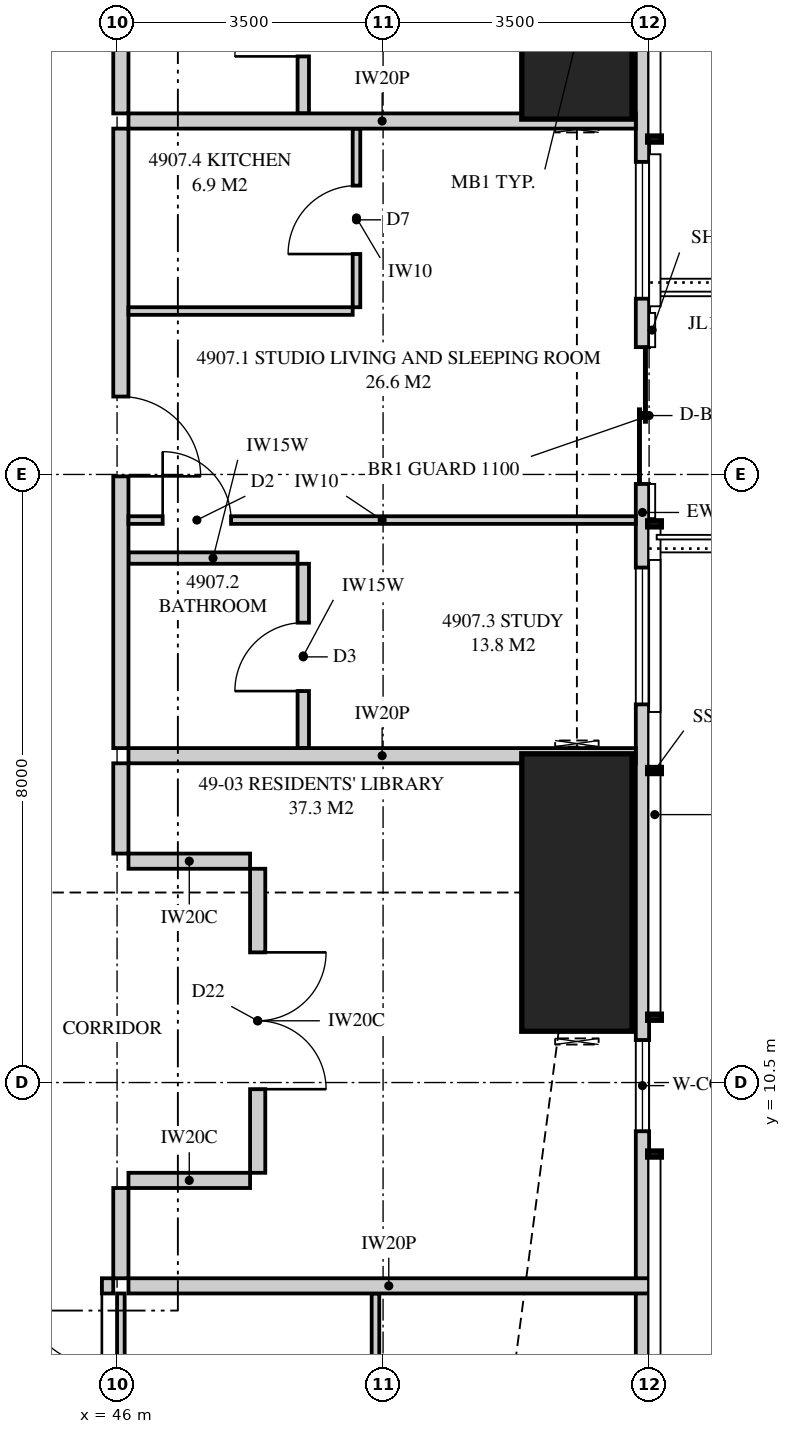
"""IFC4 building model, lengths in metres.
Left out: names, types, materials, properties, quantities, classifications, styles, units other than length and angle.
Written with IfcOpenShell. Run it as: python <this file> out.ifc"""

import sys

from ifc_helpers import new_model, si_unit, direction, frame, frame_2d, origin, origin_2d, place, context, subcontext, project, spatial, polyline, rectangle, outline, extrude, element, fill, save


model = new_model("IFC4")
c1 = context("Model", 3, precision=1e-05, world=origin(), true_north=direction((0.0, 1.0)))
c2 = subcontext(c1, "Body", "Model", "MODEL_VIEW")
j1 = project(units=[si_unit("LENGTHUNIT", "METRE"), si_unit("PLANEANGLEUNIT", "RADIAN")], contexts=[c1])
p1 = place(None, origin())
s1 = spatial("IfcSite", under=j1, at=p1, CompositionType="ELEMENT")
p2 = place(p1, origin())
s2 = spatial("IfcBuilding", under=s1, at=p2, CompositionType="ELEMENT")
p3 = place(p2, frame((0.0, 0.0, 181.15)))
s3 = spatial("IfcBuildingStorey", under=s2, at=p3, CompositionType="ELEMENT", Elevation=181.15)
for number, where, z_axis, x_axis in (
    (1, (52.05, 13.0, 0.0), (0.0, 0.0, 1.0), (1.0, 0.0, 0.0)),
    (2, (52.05, 25.0, 0.0), (0.0, 0.0, 1.0), (1.0, 0.0, 0.0)),
):
    element("IfcColumn", number, at=place(p3, frame(where, z_axis=z_axis, x_axis=x_axis)), inside=s3, PredefinedType="COLUMN", context=c2, shape_type="SweptSolid", body=[
        extrude(rectangle(XDim=1.45, YDim=3.65, at=origin_2d()), origin(), (0.0, 0.0, 1.0), 3.35),
    ])
p4 = place(p3, frame((52.913, 3.051, 0.0), z_axis=(0.0, 0.0, 1.0), x_axis=(0.0, 1.0, 0.0)))
e3 = element("IfcWall", 3, at=p4, inside=s3, PredefinedType="SOLIDWALL", context=c2, shape_type="SweptSolid", body=[
    extrude(outline(polyline([(0.0, 0.0), (29.897, 0.0), (29.897, 3.11), (22.167, 3.11), (22.167, 2.15), (22.074, 2.15), (22.074, 3.11), (21.949, 3.11), (21.949, 2.15), (9.949, 2.15), (9.949, 3.11), (9.847, 3.11), (9.847, 2.15), (9.706, 2.15), (9.706, 3.11), (0.0, 3.11), (0.0, 0.0)])), frame((0.0, 0.087, 0.0), z_axis=(0.0, -1.0, 0.0), x_axis=(1.0, 0.0, 0.0)), (0.0, 0.0, 1.0), 0.175),
])
p5 = place(p4, frame((6.808, 0.0, 0.4)))
e4 = element("IfcOpeningElement", 4, at=p5, cuts=e3, PredefinedType="OPENING", context=c2, shape_type="SweptSolid", body=[
    extrude(rectangle(XDim=1.2, YDim=1.7, at=frame_2d((0.6, 0.85))), frame((0.0, 0.097, 0.0), z_axis=(0.0, -1.0, 0.0), x_axis=(1.0, 0.0, 0.0)), (0.0, 0.0, 1.0), 0.195),
])
p6 = place(p4, frame((12.424, 0.0, 0.4)))
e5 = element("IfcOpeningElement", 5, at=p6, cuts=e3, PredefinedType="OPENING", context=c2, shape_type="SweptSolid", body=[
    extrude(rectangle(XDim=1.8, YDim=1.7, at=frame_2d((0.9, 0.85))), frame((0.0, 0.097, 0.0), z_axis=(0.0, -1.0, 0.0), x_axis=(1.0, 0.0, 0.0)), (0.0, 0.0, 1.0), 0.195),
])
p7 = place(p4, frame((15.324, 0.0, 0.0)))
e6 = element("IfcOpeningElement", 6, at=p7, cuts=e3, PredefinedType="OPENING", context=c2, shape_type="SweptSolid", body=[
    extrude(rectangle(XDim=1.8, YDim=2.1, at=frame_2d((0.9, 1.05))), frame((0.0, 0.097, 0.0), z_axis=(0.0, -1.0, 0.0), x_axis=(1.0, 0.0, 0.0)), (0.0, 0.0, 1.0), 0.195),
])
p8 = place(p4, frame((17.761, 0.0, 0.4)))
e7 = element("IfcOpeningElement", 7, at=p8, cuts=e3, PredefinedType="OPENING", context=c2, shape_type="SweptSolid", body=[
    extrude(rectangle(XDim=1.8, YDim=1.7, at=frame_2d((0.9, 0.85))), frame((0.0, 0.097, 0.0), z_axis=(0.0, -1.0, 0.0), x_axis=(1.0, 0.0, 0.0)), (0.0, 0.0, 1.0), 0.195),
])
p9 = place(p4, frame((23.874, 0.0, 0.4)))
e8 = element("IfcOpeningElement", 8, at=p9, cuts=e3, PredefinedType="OPENING", context=c2, shape_type="SweptSolid", body=[
    extrude(rectangle(XDim=1.8, YDim=1.7, at=frame_2d((0.9, 0.85))), frame((0.0, 0.097, 0.0), z_axis=(0.0, -1.0, 0.0), x_axis=(1.0, 0.0, 0.0)), (0.0, 0.0, 1.0), 0.195),
])
p10 = place(p4, frame((26.871, 0.0, 0.4)))
e9 = element("IfcOpeningElement", 9, at=p10, cuts=e3, PredefinedType="OPENING", context=c2, shape_type="SweptSolid", body=[
    extrude(rectangle(XDim=1.8, YDim=1.7, at=frame_2d((0.9, 0.85))), frame((0.0, 0.097, 0.0), z_axis=(0.0, -1.0, 0.0), x_axis=(1.0, 0.0, 0.0)), (0.0, 0.0, 1.0), 0.195),
])
p11 = place(p3, frame((42.05, 7.825, 0.0), z_axis=(0.0, 0.0, 1.0), x_axis=(1.0, 0.0, 0.0)))
e10 = element("IfcWall", 10, at=p11, inside=s3, PredefinedType="PARTITIONING", context=c2, shape_type="SweptSolid", body=[
    extrude(outline(polyline([(0.0, 0.0), (3.9, 0.0), (3.9, 3.11), (1.037, 3.11), (1.037, 2.541), (0.363, 2.541), (0.363, 3.11), (0.0, 3.11), (0.0, 0.0)])), frame((0.0, 0.1, 0.0), z_axis=(0.0, -1.0, 0.0), x_axis=(1.0, 0.0, 0.0)), (0.0, 0.0, 1.0), 0.2),
])
p12 = place(p11, frame((2.7, 0.0, 0.0)))
e11 = element("IfcOpeningElement", 11, at=p12, cuts=e10, PredefinedType="OPENING", context=c2, shape_type="SweptSolid", body=[
    extrude(rectangle(XDim=1.05, YDim=2.2, at=frame_2d((0.525, 1.1))), frame((0.0, 0.11, 0.0), z_axis=(0.0, -1.0, 0.0), x_axis=(1.0, 0.0, 0.0)), (0.0, 0.0, 1.0), 0.22),
])
p13 = place(p3, frame((49.4, 0.175, 0.0), z_axis=(0.0, 0.0, 1.0), x_axis=(0.0, 1.0, 0.0)))
e12 = element("IfcWall", 12, at=p13, inside=s3, PredefinedType="PARTITIONING", context=c2, shape_type="SweptSolid", body=[
    extrude(outline(polyline([(0.0, 0.0), (7.55, 0.0), (7.55, 3.11), (2.825, 3.11), (2.825, 2.15), (1.079, 2.15), (1.079, 3.11), (0.0, 3.11), (0.0, 0.0)])), frame((0.0, 0.05, 0.0), z_axis=(0.0, -1.0, 0.0), x_axis=(1.0, 0.0, 0.0)), (0.0, 0.0, 1.0), 0.1),
])
p14 = place(p13, frame((3.7, 0.0, 0.0)))
e13 = element("IfcOpeningElement", 13, at=p14, cuts=e12, PredefinedType="OPENING", context=c2, shape_type="SweptSolid", body=[
    extrude(rectangle(XDim=0.9, YDim=2.1, at=frame_2d((0.45, 1.05))), frame((0.0, 0.06, 0.0), z_axis=(0.0, -1.0, 0.0), x_axis=(1.0, 0.0, 0.0)), (0.0, 0.0, 1.0), 0.12),
])
p15 = place(p3, frame((46.05, 4.775, 0.0), z_axis=(0.0, 0.0, 1.0), x_axis=(0.0, 1.0, 0.0)))
e14 = element("IfcWall", 14, at=p15, inside=s3, PredefinedType="PARTITIONING", context=c2, shape_type="SweptSolid", body=[
    extrude(rectangle(XDim=2.95, YDim=0.1, at=frame_2d((1.475, 0.0))), origin(), (0.0, 0.0, 1.0), 3.11),
])
p16 = place(p3, frame((46.15, 7.825, 0.0), z_axis=(0.0, 0.0, 1.0), x_axis=(1.0, 0.0, 0.0)))
e15 = element("IfcWall", 15, at=p16, inside=s3, PredefinedType="PARTITIONING", context=c2, shape_type="SweptSolid", body=[
    extrude(outline(polyline([(0.0, 0.0), (6.85, 0.0), (6.85, 3.11), (6.138, 3.11), (6.138, 2.15), (4.303, 2.15), (4.303, 3.11), (0.0, 3.11), (0.0, 0.0)])), frame((0.0, 0.1, 0.0), z_axis=(0.0, -1.0, 0.0), x_axis=(1.0, 0.0, 0.0)), (0.0, 0.0, 1.0), 0.2),
])
p17 = place(p3, frame((52.825, 14.8, 0.0), z_axis=(0.0, 0.0, 1.0), x_axis=(-1.0, 0.0, 0.0)))
e16 = element("IfcWall", 16, at=p17, inside=s3, PredefinedType="PARTITIONING", context=c2, shape_type="SweptSolid", body=[
    extrude(outline(polyline([(0.0, 0.0), (6.675, 0.0), (6.675, 3.11), (1.685, 3.11), (1.685, 2.15), (0.0, 2.15), (0.0, 3.11), (0.0, 0.0)])), frame((0.0, 0.1, 0.0), z_axis=(0.0, -1.0, 0.0), x_axis=(1.0, 0.0, 0.0)), (0.0, 0.0, 1.0), 0.2),
])
p18 = place(p3, frame((46.05, 7.925, 0.0), z_axis=(0.0, 0.0, 1.0), x_axis=(0.0, 1.0, 0.0)))
e17 = element("IfcWall", 17, at=p18, inside=s3, PredefinedType="PARTITIONING", context=c2, shape_type="SweptSolid", body=[
    extrude(rectangle(XDim=1.188, YDim=0.2, at=frame_2d((0.594, 0.0))), origin(), (0.0, 0.0, 1.0), 3.11),
])
p19 = place(p3, frame((52.825, 23.15, 0.0), z_axis=(0.0, 0.0, 1.0), x_axis=(-1.0, 0.0, 0.0)))
e18 = element("IfcWall", 18, at=p19, inside=s3, PredefinedType="PARTITIONING", context=c2, shape_type="SweptSolid", body=[
    extrude(outline(polyline([(0.0, 0.0), (6.675, 0.0), (6.675, 3.11), (1.685, 3.11), (1.685, 2.15), (0.0, 2.15), (0.0, 3.11), (0.0, 0.0)])), frame((0.0, 0.1, 0.0), z_axis=(0.0, -1.0, 0.0), x_axis=(1.0, 0.0, 0.0)), (0.0, 0.0, 1.0), 0.2),
])
p20 = place(p3, frame((46.05, 14.9, 0.0), z_axis=(0.0, 0.0, 1.0), x_axis=(0.0, 1.0, 0.0)))
e19 = element("IfcWall", 19, at=p20, inside=s3, PredefinedType="PARTITIONING", context=c2, shape_type="SweptSolid", body=[
    extrude(rectangle(XDim=8.15, YDim=0.2, at=frame_2d((4.075, 0.0))), origin(), (0.0, 0.0, 1.0), 3.11),
])
p21 = place(p20, frame((3.575, 0.0, 0.0)))
e20 = element("IfcOpeningElement", 20, at=p21, cuts=e19, PredefinedType="OPENING", context=c2, shape_type="SweptSolid", body=[
    extrude(rectangle(XDim=1.05, YDim=2.2, at=frame_2d((0.525, 1.1))), frame((0.0, 0.11, 0.0), z_axis=(0.0, -1.0, 0.0), x_axis=(1.0, 0.0, 0.0)), (0.0, 0.0, 1.0), 0.22),
])
p22 = place(p3, frame((48.45, 14.9, 0.0), z_axis=(0.0, 0.0, 1.0), x_axis=(0.0, 1.0, 0.0)))
e21 = element("IfcWall", 21, at=p22, inside=s3, PredefinedType="PLUMBINGWALL", context=c2, shape_type="SweptSolid", body=[
    extrude(rectangle(XDim=2.425, YDim=0.15, at=frame_2d((1.212, 0.0))), origin(), (0.0, 0.0, 1.0), 3.11),
])
p23 = place(p22, frame((0.75, 0.0, 0.0)))
e22 = element("IfcOpeningElement", 22, at=p23, cuts=e21, PredefinedType="OPENING", context=c2, shape_type="SweptSolid", body=[
    extrude(rectangle(XDim=0.9, YDim=2.1, at=frame_2d((0.45, 1.05))), frame((0.0, 0.085, 0.0), z_axis=(0.0, -1.0, 0.0), x_axis=(1.0, 0.0, 0.0)), (0.0, 0.0, 1.0), 0.17),
])
p24 = place(p3, frame((48.375, 17.4, 0.0), z_axis=(0.0, 0.0, 1.0), x_axis=(-1.0, 0.0, 0.0)))
e23 = element("IfcWall", 23, at=p24, inside=s3, PredefinedType="PLUMBINGWALL", context=c2, shape_type="SweptSolid", body=[
    extrude(rectangle(XDim=2.225, YDim=0.15, at=frame_2d((1.113, 0.0))), origin(), (0.0, 0.0, 1.0), 3.11),
])
p25 = place(p3, frame((52.825, 17.9, 0.0), z_axis=(0.0, 0.0, 1.0), x_axis=(-1.0, 0.0, 0.0)))
e24 = element("IfcWall", 24, at=p25, inside=s3, PredefinedType="PARTITIONING", context=c2, shape_type="SweptSolid", body=[
    extrude(outline(polyline([(0.0, 0.0), (6.675, 0.0), (6.675, 3.11), (1.635, 3.11), (1.635, 2.15), (0.0, 2.15), (0.0, 3.11), (0.0, 0.0)])), frame((0.0, 0.05, 0.0), z_axis=(0.0, -1.0, 0.0), x_axis=(1.0, 0.0, 0.0)), (0.0, 0.0, 1.0), 0.1),
])
p26 = place(p25, frame((5.325, 0.0, 0.0)))
e25 = element("IfcOpeningElement", 25, at=p26, cuts=e24, PredefinedType="OPENING", context=c2, shape_type="SweptSolid", body=[
    extrude(rectangle(XDim=0.9, YDim=2.1, at=frame_2d((0.45, 1.05))), frame((0.0, 0.06, 0.0), z_axis=(0.0, -1.0, 0.0), x_axis=(1.0, 0.0, 0.0)), (0.0, 0.0, 1.0), 0.12),
])
p27 = place(p3, frame((49.15, 20.7, 0.0), z_axis=(0.0, 0.0, 1.0), x_axis=(0.0, 1.0, 0.0)))
e26 = element("IfcWall", 26, at=p27, inside=s3, PredefinedType="PARTITIONING", context=c2, shape_type="SweptSolid", body=[
    extrude(rectangle(XDim=2.35, YDim=0.1, at=frame_2d((1.175, 0.0))), origin(), (0.0, 0.0, 1.0), 3.11),
])
p28 = place(p27, frame((0.7, 0.0, 0.0)))
e27 = element("IfcOpeningElement", 27, at=p28, cuts=e26, PredefinedType="OPENING", context=c2, shape_type="SweptSolid", body=[
    extrude(rectangle(XDim=0.9, YDim=2.1, at=frame_2d((0.45, 1.05))), frame((0.0, 0.06, 0.0), z_axis=(0.0, -1.0, 0.0), x_axis=(1.0, 0.0, 0.0)), (0.0, 0.0, 1.0), 0.12),
])
p29 = place(p3, frame((49.1, 20.65, 0.0), z_axis=(0.0, 0.0, 1.0), x_axis=(-1.0, 0.0, 0.0)))
e28 = element("IfcWall", 28, at=p29, inside=s3, PredefinedType="PARTITIONING", context=c2, shape_type="SweptSolid", body=[
    extrude(rectangle(XDim=2.95, YDim=0.1, at=frame_2d((1.475, 0.0))), origin(), (0.0, 0.0, 1.0), 3.11),
])
p30 = place(p3, frame((46.05, 23.25, 0.0), z_axis=(0.0, 0.0, 1.0), x_axis=(0.0, 1.0, 0.0)))
e29 = element("IfcWall", 29, at=p30, inside=s3, PredefinedType="PARTITIONING", context=c2, shape_type="SweptSolid", body=[
    extrude(outline(polyline([(0.0, 0.0), (5.825, 0.0), (5.825, 3.11), (2.087, 3.11), (2.087, 2.541), (1.413, 2.541), (1.413, 3.11), (0.0, 3.11), (0.0, 0.0)])), frame((0.0, 0.1, 0.0), z_axis=(0.0, -1.0, 0.0), x_axis=(1.0, 0.0, 0.0)), (0.0, 0.0, 1.0), 0.2),
])
p31 = place(p30, frame((2.413, 0.0, 0.0)))
e30 = element("IfcOpeningElement", 30, at=p31, cuts=e29, PredefinedType="OPENING", context=c2, shape_type="SweptSolid", body=[
    extrude(rectangle(XDim=1.05, YDim=2.2, at=frame_2d((0.525, 1.1))), frame((0.0, 0.11, 0.0), z_axis=(0.0, -1.0, 0.0), x_axis=(1.0, 0.0, 0.0)), (0.0, 0.0, 1.0), 0.22),
])
p32 = place(p3, frame((48.45, 23.25, 0.0), z_axis=(0.0, 0.0, 1.0), x_axis=(0.0, 1.0, 0.0)))
e31 = element("IfcWall", 31, at=p32, inside=s3, PredefinedType="PLUMBINGWALL", context=c2, shape_type="SweptSolid", body=[
    extrude(outline(polyline([(0.0, 0.0), (2.425, 0.0), (2.425, 3.11), (2.062, 3.11), (2.062, 2.541), (1.438, 2.541), (1.438, 3.11), (0.0, 3.11), (0.0, 0.0)])), frame((0.0, 0.075, 0.0), z_axis=(0.0, -1.0, 0.0), x_axis=(1.0, 0.0, 0.0)), (0.0, 0.0, 1.0), 0.15),
])
p33 = place(p32, frame((0.75, 0.0, 0.0)))
e32 = element("IfcOpeningElement", 32, at=p33, cuts=e31, PredefinedType="OPENING", context=c2, shape_type="SweptSolid", body=[
    extrude(rectangle(XDim=0.9, YDim=2.1, at=frame_2d((0.45, 1.05))), frame((0.0, 0.085, 0.0), z_axis=(0.0, -1.0, 0.0), x_axis=(1.0, 0.0, 0.0)), (0.0, 0.0, 1.0), 0.17),
])
p34 = place(p3, frame((46.05, 13.512, 0.0), z_axis=(0.0, 0.0, 1.0), x_axis=(0.0, 1.0, 0.0)))
e33 = element("IfcWall", 33, at=p34, inside=s3, PredefinedType="PARTITIONING", context=c2, shape_type="SweptSolid", body=[
    extrude(rectangle(XDim=1.188, YDim=0.2, at=frame_2d((0.594, 0.0))), origin(), (0.0, 0.0, 1.0), 3.11),
])
p35 = place(p3, frame((47.85, 9.312, 0.0), z_axis=(0.0, 0.0, 1.0), x_axis=(0.0, 1.0, 0.0)))
e34 = element("IfcWall", 34, at=p35, inside=s3, PredefinedType="PARTITIONING", context=c2, shape_type="SweptSolid", body=[
    extrude(outline(polyline([(0.0, 0.0), (4.0, 0.0), (4.0, 3.11), (4.0, 2.541), (3.35, 2.541), (3.35, 3.11), (0.0, 3.11), (0.0, 0.0)])), frame((0.0, 0.1, 0.0), z_axis=(0.0, -1.0, 0.0), x_axis=(1.0, 0.0, 0.0)), (0.0, 0.0, 1.0), 0.2),
])
p36 = place(p35, frame((1.1, 0.0, 0.0)))
e35 = element("IfcOpeningElement", 35, at=p36, cuts=e34, PredefinedType="OPENING", context=c2, shape_type="SweptSolid", body=[
    extrude(rectangle(XDim=1.8, YDim=2.1, at=frame_2d((0.9, 1.05))), frame((0.0, 0.11, 0.0), z_axis=(0.0, -1.0, 0.0), x_axis=(1.0, 0.0, 0.0)), (0.0, 0.0, 1.0), 0.22),
])
for number, where, z_axis, x_axis in (
    (36, (46.15, 9.212, 0.0), (0.0, 0.0, 1.0), (1.0, 0.0, 0.0)),
    (37, (46.15, 13.413, 0.0), (0.0, 0.0, 1.0), (1.0, 0.0, 0.0)),
):
    element("IfcWall", number, at=place(p3, frame(where, z_axis=z_axis, x_axis=x_axis)), inside=s3, PredefinedType="PARTITIONING", context=c2, shape_type="SweptSolid", body=[
        extrude(rectangle(XDim=1.6, YDim=0.2, at=frame_2d((0.8, 0.0))), origin(), (0.0, 0.0, 1.0), 3.11),
    ])
p37 = place(p5, origin())
e38 = element("IfcWindow", 38, at=p37, inside=s3, PartitioningType="SINGLE_PANEL", PredefinedType="WINDOW", context=c2, shape_type="SweptSolid", body=[
    extrude(rectangle(XDim=1.2, YDim=1.7, at=frame_2d((0.6, 0.85))), frame((0.0, 0.03, 0.0), z_axis=(0.0, -1.0, 0.0), x_axis=(1.0, 0.0, 0.0)), (0.0, 0.0, 1.0), 0.06),
])
fill(e4, e38)
p38 = place(p6, origin())
e39 = element("IfcWindow", 39, at=p38, inside=s3, PartitioningType="SINGLE_PANEL", PredefinedType="WINDOW", context=c2, shape_type="SweptSolid", body=[
    extrude(rectangle(XDim=1.8, YDim=1.7, at=frame_2d((0.9, 0.85))), frame((0.0, 0.03, 0.0), z_axis=(0.0, -1.0, 0.0), x_axis=(1.0, 0.0, 0.0)), (0.0, 0.0, 1.0), 0.06),
])
fill(e5, e39)
p39 = place(p7, origin())
e40 = element("IfcDoor", 40, at=p39, inside=s3, OperationType="SLIDING_TO_LEFT", PredefinedType="DOOR", context=c2, shape_type="SweptSolid", body=[
    extrude(rectangle(XDim=1.8, YDim=2.1, at=frame_2d((0.9, 1.05))), frame((0.0, 0.025, 0.0), z_axis=(0.0, -1.0, 0.0), x_axis=(1.0, 0.0, 0.0)), (0.0, 0.0, 1.0), 0.05),
])
fill(e6, e40)
p40 = place(p8, origin())
e41 = element("IfcWindow", 41, at=p40, inside=s3, PartitioningType="SINGLE_PANEL", PredefinedType="WINDOW", context=c2, shape_type="SweptSolid", body=[
    extrude(rectangle(XDim=1.8, YDim=1.7, at=frame_2d((0.9, 0.85))), frame((0.0, 0.03, 0.0), z_axis=(0.0, -1.0, 0.0), x_axis=(1.0, 0.0, 0.0)), (0.0, 0.0, 1.0), 0.06),
])
fill(e7, e41)
p41 = place(p12, frame((1.05, 0.0, 0.0), z_axis=(0.0, 0.0, 1.0), x_axis=(-1.0, 0.0, 0.0)))
e42 = element("IfcDoor", 42, at=p41, inside=s3, OperationType="SINGLE_SWING_LEFT", PredefinedType="DOOR", context=c2, shape_type="SweptSolid", body=[
    extrude(rectangle(XDim=1.05, YDim=2.2, at=frame_2d((0.525, 1.1))), frame((0.0, 0.025, 0.0), z_axis=(0.0, -1.0, 0.0), x_axis=(1.0, 0.0, 0.0)), (0.0, 0.0, 1.0), 0.05),
])
fill(e11, e42)
p42 = place(p36, frame((1.8, 0.0, 0.0), z_axis=(0.0, 0.0, 1.0), x_axis=(-1.0, 0.0, 0.0)))
e43 = element("IfcDoor", 43, at=p42, inside=s3, OperationType="DOUBLE_DOOR_SINGLE_SWING", PredefinedType="DOOR", context=c2, shape_type="SweptSolid", body=[
    extrude(rectangle(XDim=1.8, YDim=2.1, at=frame_2d((0.9, 1.05))), frame((0.0, 0.025, 0.0), z_axis=(0.0, -1.0, 0.0), x_axis=(1.0, 0.0, 0.0)), (0.0, 0.0, 1.0), 0.05),
])
fill(e35, e43)
p43 = place(p21, frame((1.05, 0.0, 0.0), z_axis=(0.0, 0.0, 1.0), x_axis=(-1.0, 0.0, 0.0)))
e44 = element("IfcDoor", 44, at=p43, inside=s3, OperationType="SINGLE_SWING_RIGHT", PredefinedType="DOOR", context=c2, shape_type="SweptSolid", body=[
    extrude(rectangle(XDim=1.05, YDim=2.2, at=frame_2d((0.525, 1.1))), frame((0.0, 0.025, 0.0), z_axis=(0.0, -1.0, 0.0), x_axis=(1.0, 0.0, 0.0)), (0.0, 0.0, 1.0), 0.05),
])
fill(e20, e44)
p44 = place(p23, origin())
e45 = element("IfcDoor", 45, at=p44, inside=s3, OperationType="SINGLE_SWING_LEFT", PredefinedType="DOOR", context=c2, shape_type="SweptSolid", body=[
    extrude(rectangle(XDim=0.9, YDim=2.1, at=frame_2d((0.45, 1.05))), frame((0.0, 0.025, 0.0), z_axis=(0.0, -1.0, 0.0), x_axis=(1.0, 0.0, 0.0)), (0.0, 0.0, 1.0), 0.05),
])
fill(e22, e45)
p45 = place(p26, frame((0.9, 0.0, 0.0), z_axis=(0.0, 0.0, 1.0), x_axis=(-1.0, 0.0, 0.0)))
e46 = element("IfcDoor", 46, at=p45, inside=s3, OperationType="SINGLE_SWING_LEFT", PredefinedType="DOOR", context=c2, shape_type="SweptSolid", body=[
    extrude(rectangle(XDim=0.9, YDim=2.1, at=frame_2d((0.45, 1.05))), frame((0.0, 0.025, 0.0), z_axis=(0.0, -1.0, 0.0), x_axis=(1.0, 0.0, 0.0)), (0.0, 0.0, 1.0), 0.05),
])
fill(e25, e46)
p46 = place(p28, origin())
e47 = element("IfcDoor", 47, at=p46, inside=s3, OperationType="SINGLE_SWING_LEFT", PredefinedType="DOOR", context=c2, shape_type="SweptSolid", body=[
    extrude(rectangle(XDim=0.9, YDim=2.1, at=frame_2d((0.45, 1.05))), frame((0.0, 0.025, 0.0), z_axis=(0.0, -1.0, 0.0), x_axis=(1.0, 0.0, 0.0)), (0.0, 0.0, 1.0), 0.05),
])
fill(e27, e47)
p47 = place(p33, origin())
e48 = element("IfcDoor", 48, at=p47, inside=s3, OperationType="SINGLE_SWING_LEFT", PredefinedType="DOOR", context=c2, shape_type="SweptSolid", body=[
    extrude(rectangle(XDim=0.9, YDim=2.1, at=frame_2d((0.45, 1.05))), frame((0.0, 0.025, 0.0), z_axis=(0.0, -1.0, 0.0), x_axis=(1.0, 0.0, 0.0)), (0.0, 0.0, 1.0), 0.05),
])
fill(e32, e48)
save(model, sys.argv[1])
